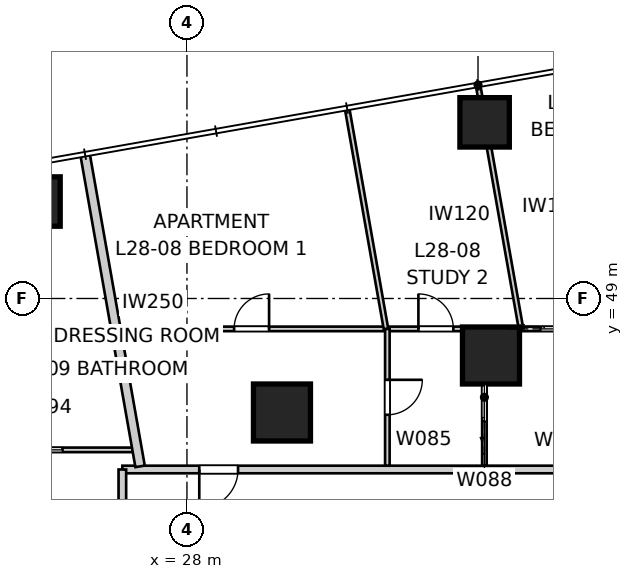
"""IFC4 building model, lengths in metres.
Left out: names, types, materials, properties, quantities, classifications, styles, units other than length and angle.
Written with IfcOpenShell. Run it as: python <this file> out.ifc"""

import sys

from ifc_helpers import new_model, si_unit, direction, frame, frame_2d, origin, origin_2d, place, context, subcontext, project, spatial, rectangle, extrude, element, fill, save


model = new_model("IFC4")
c1 = context("Model", 3, precision=1e-05, world=origin(), true_north=direction((0.0, 1.0)))
c2 = subcontext(c1, "Body", "Model", "MODEL_VIEW")
j1 = project(units=[si_unit("LENGTHUNIT", "METRE"), si_unit("PLANEANGLEUNIT", "RADIAN")], contexts=[c1])
p1 = place(None, origin())
s1 = spatial("IfcSite", under=j1, at=p1, CompositionType="ELEMENT")
p2 = place(p1, origin())
s2 = spatial("IfcBuilding", under=s1, at=p2, CompositionType="ELEMENT")
p3 = place(p2, frame((0.0, 0.0, 103.2)))
s3 = spatial("IfcBuildingStorey", under=s2, at=p3, CompositionType="ELEMENT", Elevation=103.2)
for number, where, z_axis, x_axis in (
    (1, (35.833, 53.635, 0.0), (0.0, 0.0, 1.0), (1.0, 0.0, 0.0)),
    (2, (24.015, 51.552, 0.0), (0.0, 0.0, 1.0), (1.0, 0.0, 0.0)),
):
    element("IfcColumn", number, at=place(p3, frame(where, z_axis=z_axis, x_axis=x_axis)), inside=s3, PredefinedType="COLUMN", context=c2, shape_type="SweptSolid", body=[
        extrude(rectangle(XDim=1.3, YDim=1.3, at=origin_2d()), origin(), (0.0, 0.0, 1.0), 3.2),
    ])
for number, where, z_axis, x_axis in (
    (3, (36.0, 47.5, 0.0), (0.0, 0.0, 1.0), (1.0, 0.0, 0.0)),
    (4, (30.5, 46.0, 0.0), (0.0, 0.0, 1.0), (1.0, 0.0, 0.0)),
):
    element("IfcColumn", number, at=place(p3, frame(where, z_axis=z_axis, x_axis=x_axis)), inside=s3, PredefinedType="COLUMN", context=c2, shape_type="SweptSolid", body=[
        extrude(rectangle(XDim=1.5, YDim=1.5, at=origin_2d()), origin(), (0.0, 0.0, 1.0), 3.4),
    ])
p4 = place(p3, frame((53.7, 44.5, 0.0), z_axis=(0.0, 0.0, 1.0), x_axis=(-1.0, 0.0, 0.0)))
e5 = element("IfcWall", 5, at=p4, inside=s3, PredefinedType="PARTITIONING", context=c2, shape_type="SweptSolid", body=[
    extrude(rectangle(XDim=27.4, YDim=0.2, at=frame_2d((13.7, 0.0))), origin(), (0.0, 0.0, 1.0), 3.2),
])
p5 = place(p4, frame((24.356, 0.0, 0.0)))
e6 = element("IfcOpeningElement", 6, at=p5, cuts=e5, PredefinedType="OPENING", context=c2, shape_type="SweptSolid", body=[
    extrude(rectangle(XDim=1.02, YDim=2.0, at=frame_2d((0.51, 1.0))), frame((0.0, 0.11, 0.0), z_axis=(0.0, -1.0, 0.0), x_axis=(1.0, 0.0, 0.0)), (0.0, 0.0, 1.0), 0.22),
])
p6 = place(p4, frame((2.005, 0.0, 0.0)))
e7 = element("IfcOpeningElement", 7, at=p6, cuts=e5, PredefinedType="OPENING", context=c2, shape_type="SweptSolid", body=[
    extrude(rectangle(XDim=1.02, YDim=2.0, at=frame_2d((0.51, 1.0))), frame((0.0, 0.11, 0.0), z_axis=(0.0, -1.0, 0.0), x_axis=(1.0, 0.0, 0.0)), (0.0, 0.0, 1.0), 0.22),
])
p7 = place(p3, frame((26.3, 44.5, 0.0), z_axis=(0.0, 0.0, 1.0), x_axis=(0.0, -1.0, 0.0)))
e8 = element("IfcWall", 8, at=p7, inside=s3, PredefinedType="PARTITIONING", context=c2, shape_type="SweptSolid", body=[
    extrude(rectangle(XDim=29.0, YDim=0.2, at=frame_2d((14.5, 0.0))), origin(), (0.0, 0.0, 1.0), 3.2),
])
p8 = place(p7, frame((14.257, 0.0, 0.0)))
e9 = element("IfcOpeningElement", 9, at=p8, cuts=e8, PredefinedType="OPENING", context=c2, shape_type="SweptSolid", body=[
    extrude(rectangle(XDim=1.02, YDim=2.34, at=frame_2d((0.51, 1.17))), frame((0.0, 0.11, 0.0), z_axis=(0.0, -1.0, 0.0), x_axis=(1.0, 0.0, 0.0)), (0.0, 0.0, 1.0), 0.22),
])
p9 = place(p7, frame((18.322, 0.0, 0.0)))
e10 = element("IfcOpeningElement", 10, at=p9, cuts=e8, PredefinedType="OPENING", context=c2, shape_type="SweptSolid", body=[
    extrude(rectangle(XDim=1.02, YDim=2.34, at=frame_2d((0.51, 1.17))), frame((0.0, 0.11, 0.0), z_axis=(0.0, -1.0, 0.0), x_axis=(1.0, 0.0, 0.0)), (0.0, 0.0, 1.0), 0.22),
])
p10 = place(p7, frame((4.263, 0.0, 0.0)))
e11 = element("IfcOpeningElement", 11, at=p10, cuts=e8, PredefinedType="OPENING", context=c2, shape_type="SweptSolid", body=[
    extrude(rectangle(XDim=1.02, YDim=2.34, at=frame_2d((0.51, 1.17))), frame((0.0, 0.11, 0.0), z_axis=(0.0, -1.0, 0.0), x_axis=(1.0, 0.0, 0.0)), (0.0, 0.0, 1.0), 0.22),
])
p11 = place(p3, frame((25.318, 52.797, 0.0), z_axis=(0.0, 0.0, 1.0), x_axis=(0.173651756605, -0.984807121942, 0.0)))
e12 = element("IfcWall", 12, at=p11, inside=s3, PredefinedType="PARTITIONING", context=c2, shape_type="SweptSolid", body=[
    extrude(rectangle(XDim=8.341, YDim=0.25, at=frame_2d((4.171, 0.0))), origin(), (0.0, 0.0, 1.0), 3.2),
])
p12 = place(p3, frame((21.8, 48.2, 0.0), z_axis=(0.0, 0.0, 1.0), x_axis=(1.0, 0.0, 0.0)))
e13 = element("IfcWall", 13, at=p12, inside=s3, PredefinedType="PARTITIONING", context=c2, shape_type="SweptSolid", body=[
    extrude(rectangle(XDim=36.4, YDim=0.12, at=frame_2d((18.2, 0.0))), origin(), (0.0, 0.0, 1.0), 3.2),
])
p13 = place(p12, frame((7.441, 0.0, 0.0)))
e14 = element("IfcOpeningElement", 14, at=p13, cuts=e13, PredefinedType="OPENING", context=c2, shape_type="SweptSolid", body=[
    extrude(rectangle(XDim=0.92, YDim=2.34, at=frame_2d((0.46, 1.17))), frame((0.0, 0.07, 0.0), z_axis=(0.0, -1.0, 0.0), x_axis=(1.0, 0.0, 0.0)), (0.0, 0.0, 1.0), 0.14),
])
p14 = place(p12, frame((28.144, 0.0, 0.0)))
e15 = element("IfcOpeningElement", 15, at=p14, cuts=e13, PredefinedType="OPENING", context=c2, shape_type="SweptSolid", body=[
    extrude(rectangle(XDim=0.92, YDim=2.34, at=frame_2d((0.46, 1.17))), frame((0.0, 0.07, 0.0), z_axis=(0.0, -1.0, 0.0), x_axis=(1.0, 0.0, 0.0)), (0.0, 0.0, 1.0), 0.14),
])
p15 = place(p12, frame((12.29, 0.0, 0.0)))
e16 = element("IfcOpeningElement", 16, at=p15, cuts=e13, PredefinedType="OPENING", context=c2, shape_type="SweptSolid", body=[
    extrude(rectangle(XDim=0.92, YDim=2.34, at=frame_2d((0.46, 1.17))), frame((0.0, 0.07, 0.0), z_axis=(0.0, -1.0, 0.0), x_axis=(1.0, 0.0, 0.0)), (0.0, 0.0, 1.0), 0.14),
])
p16 = place(p12, frame((15.505, 0.0, 0.0)))
e17 = element("IfcOpeningElement", 17, at=p16, cuts=e13, PredefinedType="OPENING", context=c2, shape_type="SweptSolid", body=[
    extrude(rectangle(XDim=0.96, YDim=2.1, at=frame_2d((0.48, 1.05))), frame((0.0, 0.07, 0.0), z_axis=(0.0, -1.0, 0.0), x_axis=(1.0, 0.0, 0.0)), (0.0, 0.0, 1.0), 0.14),
])
p17 = place(p12, frame((18.991, 0.0, 0.0)))
e18 = element("IfcOpeningElement", 18, at=p17, cuts=e13, PredefinedType="OPENING", context=c2, shape_type="SweptSolid", body=[
    extrude(rectangle(XDim=0.96, YDim=2.1, at=frame_2d((0.48, 1.05))), frame((0.0, 0.07, 0.0), z_axis=(0.0, -1.0, 0.0), x_axis=(1.0, 0.0, 0.0)), (0.0, 0.0, 1.0), 0.14),
])
p18 = place(p3, frame((33.273, 48.2, 0.0), z_axis=(0.0, 0.0, 1.0), x_axis=(0.0, -1.0, 0.0)))
e19 = element("IfcWall", 19, at=p18, inside=s3, PredefinedType="PARTITIONING", context=c2, shape_type="SweptSolid", body=[
    extrude(rectangle(XDim=3.6, YDim=0.12, at=frame_2d((1.8, 0.0))), origin(), (0.0, 0.0, 1.0), 3.2),
])
p19 = place(p18, frame((1.34, 0.0, 0.0)))
e20 = element("IfcOpeningElement", 20, at=p19, cuts=e19, PredefinedType="OPENING", context=c2, shape_type="SweptSolid", body=[
    extrude(rectangle(XDim=0.92, YDim=2.1, at=frame_2d((0.46, 1.05))), frame((0.0, 0.07, 0.0), z_axis=(0.0, -1.0, 0.0), x_axis=(1.0, 0.0, 0.0)), (0.0, 0.0, 1.0), 0.14),
])
p20 = place(p3, frame((35.827, 44.6, 0.0), z_axis=(0.0, 0.0, 1.0), x_axis=(0.0, 1.0, 0.0)))
e21 = element("IfcWall", 21, at=p20, inside=s3, PredefinedType="PARTITIONING", context=c2, shape_type="SweptSolid", body=[
    extrude(rectangle(XDim=3.6, YDim=0.12, at=frame_2d((1.8, 0.0))), origin(), (0.0, 0.0, 1.0), 3.2),
])
p21 = place(p20, frame((1.17, 0.0, 0.0)))
e22 = element("IfcOpeningElement", 22, at=p21, cuts=e21, PredefinedType="OPENING", context=c2, shape_type="SweptSolid", body=[
    extrude(rectangle(XDim=0.96, YDim=2.1, at=frame_2d((0.48, 1.05))), frame((0.0, 0.07, 0.0), z_axis=(0.0, -1.0, 0.0), x_axis=(1.0, 0.0, 0.0)), (0.0, 0.0, 1.0), 0.14),
])
p22 = place(p3, frame((32.219, 53.973, 0.0), z_axis=(0.0, 0.0, 1.0), x_axis=(0.173623777139, -0.984812055172, 0.0)))
e23 = element("IfcWall", 23, at=p22, inside=s3, PredefinedType="PARTITIONING", context=c2, shape_type="SweptSolid", body=[
    extrude(rectangle(XDim=5.862, YDim=0.12, at=frame_2d((2.931, 0.0))), origin(), (0.0, 0.0, 1.0), 3.2),
])
p23 = place(p3, frame((36.791, 48.2, 0.0), z_axis=(0.0, 0.0, 1.0), x_axis=(-0.173630564586, 0.984810858511, 0.0)))
e24 = element("IfcWall", 24, at=p23, inside=s3, PredefinedType="PARTITIONING", context=c2, shape_type="SweptSolid", body=[
    extrude(rectangle(XDim=6.479, YDim=0.12, at=frame_2d((3.24, 0.0))), origin(), (0.0, 0.0, 1.0), 3.2),
])
p24 = place(p3, frame((21.8, 45.017, 0.0), z_axis=(0.0, 0.0, 1.0), x_axis=(1.0, 0.0, 0.0)))
e25 = element("IfcWall", 25, at=p24, inside=s3, PredefinedType="PARTITIONING", context=c2, shape_type="SweptSolid", body=[
    extrude(rectangle(XDim=4.89, YDim=0.12, at=frame_2d((2.445, 0.0))), origin(), (0.0, 0.0, 1.0), 3.2),
])
p25 = place(p24, frame((1.965, 0.0, 0.0)))
e26 = element("IfcOpeningElement", 26, at=p25, cuts=e25, PredefinedType="OPENING", context=c2, shape_type="SweptSolid", body=[
    extrude(rectangle(XDim=0.96, YDim=2.1, at=frame_2d((0.48, 1.05))), frame((0.0, 0.07, 0.0), z_axis=(0.0, -1.0, 0.0), x_axis=(1.0, 0.0, 0.0)), (0.0, 0.0, 1.0), 0.14),
])
p26 = place(p5, origin())
e27 = element("IfcDoor", 27, at=p26, inside=s3, OperationType="SINGLE_SWING_RIGHT", PredefinedType="DOOR", context=c2, shape_type="SweptSolid", body=[
    extrude(rectangle(XDim=1.02, YDim=2.0, at=frame_2d((0.51, 1.0))), frame((0.0, 0.025, 0.0), z_axis=(0.0, -1.0, 0.0), x_axis=(1.0, 0.0, 0.0)), (0.0, 0.0, 1.0), 0.05),
])
fill(e6, e27)
p27 = place(p13, origin())
e28 = element("IfcDoor", 28, at=p27, inside=s3, OperationType="SINGLE_SWING_RIGHT", PredefinedType="DOOR", context=c2, shape_type="SweptSolid", body=[
    extrude(rectangle(XDim=0.92, YDim=2.34, at=frame_2d((0.46, 1.17))), frame((0.0, 0.025, 0.0), z_axis=(0.0, -1.0, 0.0), x_axis=(1.0, 0.0, 0.0)), (0.0, 0.0, 1.0), 0.05),
])
fill(e14, e28)
p28 = place(p19, origin())
e29 = element("IfcDoor", 29, at=p28, inside=s3, OperationType="SINGLE_SWING_LEFT", PredefinedType="DOOR", context=c2, shape_type="SweptSolid", body=[
    extrude(rectangle(XDim=0.92, YDim=2.1, at=frame_2d((0.46, 1.05))), frame((0.0, 0.025, 0.0), z_axis=(0.0, -1.0, 0.0), x_axis=(1.0, 0.0, 0.0)), (0.0, 0.0, 1.0), 0.05),
])
fill(e20, e29)
p29 = place(p21, origin())
e30 = element("IfcDoor", 30, at=p29, inside=s3, OperationType="SLIDING_TO_LEFT", PredefinedType="DOOR", context=c2, shape_type="SweptSolid", body=[
    extrude(rectangle(XDim=0.96, YDim=2.1, at=frame_2d((0.48, 1.05))), frame((0.0, 0.025, 0.0), z_axis=(0.0, -1.0, 0.0), x_axis=(1.0, 0.0, 0.0)), (0.0, 0.0, 1.0), 0.05),
])
fill(e22, e30)
p30 = place(p15, origin())
e31 = element("IfcDoor", 31, at=p30, inside=s3, OperationType="SINGLE_SWING_LEFT", PredefinedType="DOOR", context=c2, shape_type="SweptSolid", body=[
    extrude(rectangle(XDim=0.92, YDim=2.34, at=frame_2d((0.46, 1.17))), frame((0.0, 0.025, 0.0), z_axis=(0.0, -1.0, 0.0), x_axis=(1.0, 0.0, 0.0)), (0.0, 0.0, 1.0), 0.05),
])
fill(e16, e31)
p31 = place(p25, origin())
e32 = element("IfcDoor", 32, at=p31, inside=s3, OperationType="SLIDING_TO_LEFT", PredefinedType="DOOR", context=c2, shape_type="SweptSolid", body=[
    extrude(rectangle(XDim=0.96, YDim=2.1, at=frame_2d((0.48, 1.05))), frame((0.0, 0.025, 0.0), z_axis=(0.0, -1.0, 0.0), x_axis=(1.0, 0.0, 0.0)), (0.0, 0.0, 1.0), 0.05),
])
fill(e26, e32)
p32 = place(p16, origin())
e33 = element("IfcDoor", 33, at=p32, inside=s3, OperationType="SLIDING_TO_LEFT", PredefinedType="DOOR", context=c2, shape_type="SweptSolid", body=[
    extrude(rectangle(XDim=0.96, YDim=2.1, at=frame_2d((0.48, 1.05))), frame((0.0, 0.025, 0.0), z_axis=(0.0, -1.0, 0.0), x_axis=(1.0, 0.0, 0.0)), (0.0, 0.0, 1.0), 0.05),
])
fill(e17, e33)
save(model, sys.argv[1])
